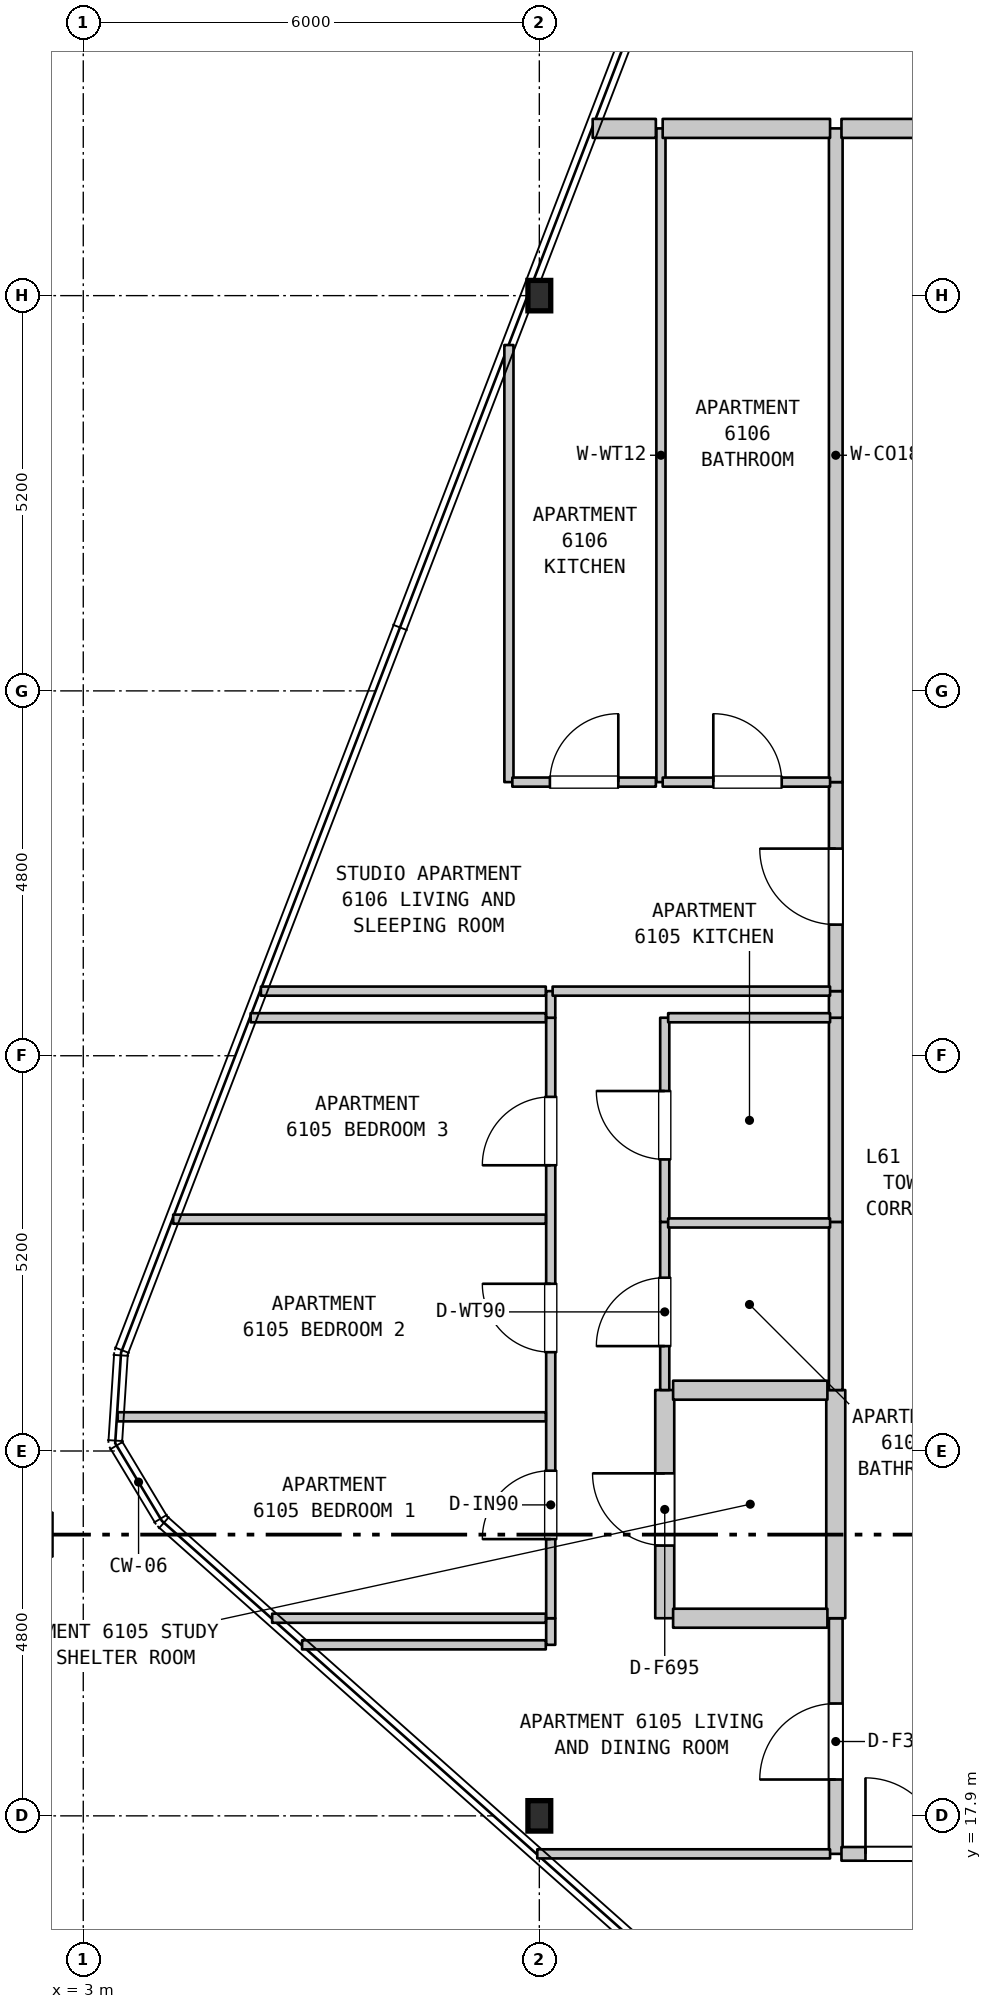
"""IFC4 building model, lengths in metres.
Left out: names, types, materials, properties, quantities, classifications, styles, units other than length and angle.
Written with IfcOpenShell. Run it as: python <this file> out.ifc"""

import sys

from ifc_helpers import new_model, si_unit, direction, frame, frame_2d, origin, origin_2d, place, context, subcontext, project, spatial, rectangle, i_section, extrude, element, fill, save


model = new_model("IFC4")
c1 = context("Model", 3, precision=1e-05, world=origin(), true_north=direction((0.0, 1.0)))
c2 = subcontext(c1, "Body", "Model", "MODEL_VIEW")
j1 = project(units=[si_unit("LENGTHUNIT", "METRE"), si_unit("PLANEANGLEUNIT", "RADIAN")], contexts=[c1])
p1 = place(None, origin())
s1 = spatial("IfcSite", under=j1, at=p1, CompositionType="ELEMENT")
p2 = place(p1, origin())
s2 = spatial("IfcBuilding", under=s1, at=p2, CompositionType="ELEMENT")
p3 = place(p2, frame((0.0, 0.0, 247.3)))
s3 = spatial("IfcBuildingStorey", under=s2, at=p3, CompositionType="ELEMENT", Elevation=247.3)
for number, where, z_axis, x_axis in (
    (1, (9.0, 17.9, 0.0), (0.0, 0.0, 1.0), (1.0, 0.0, 0.0)),
    (2, (9.0, 37.9, 0.0), (0.0, 0.0, 1.0), (1.0, 0.0, 0.0)),
):
    element("IfcColumn", number, at=place(p3, frame(where, z_axis=z_axis, x_axis=x_axis)), inside=s3, PredefinedType="COLUMN", context=c2, shape_type="SweptSolid", body=[
        extrude(i_section(OverallWidth=0.3, OverallDepth=0.4, WebThickness=0.013, FlangeThickness=0.024, FilletRadius=0.027, at=origin_2d()), origin(), (0.0, 0.0, 1.0), 3.7),
    ])
p4 = place(p3, frame((8.6, 31.5, 0.0), z_axis=(0.0, 0.0, 1.0), x_axis=(0.0, 1.0, 0.0)))
e3 = element("IfcWall", 3, at=p4, inside=s3, PredefinedType="PARTITIONING", context=c2, shape_type="SweptSolid", body=[
    extrude(rectangle(XDim=5.75, YDim=0.12, at=frame_2d((2.875, 0.0))), origin(), (0.0, 0.0, 1.0), 3.39),
])
p5 = place(p3, frame((9.15, 20.15, 0.0), z_axis=(0.0, 0.0, 1.0), x_axis=(0.0, 1.0, 0.0)))
e4 = element("IfcWall", 4, at=p5, inside=s3, PredefinedType="PARTITIONING", context=c2, shape_type="SweptSolid", body=[
    extrude(rectangle(XDim=0.35, YDim=0.12, at=frame_2d((0.175, 0.0))), origin(), (0.0, 0.0, 1.0), 3.39),
])
p6 = place(p3, frame((9.15, 20.5, 0.0), z_axis=(0.0, 0.0, 1.0), x_axis=(0.0, 1.0, 0.0)))
e5 = element("IfcWall", 5, at=p6, inside=s3, PredefinedType="PARTITIONING", context=c2, shape_type="SweptSolid", body=[
    extrude(rectangle(XDim=7.9, YDim=0.12, at=frame_2d((3.95, 0.0))), origin(), (0.0, 0.0, 1.0), 2.79),
])
p7 = place(p6, frame((1.041, 0.0, 0.0)))
e6 = element("IfcOpeningElement", 6, at=p7, cuts=e5, PredefinedType="OPENING", context=c2, shape_type="SweptSolid", body=[
    extrude(rectangle(XDim=0.9, YDim=2.15, at=frame_2d((0.45, 1.075))), frame((0.0, 0.07, 0.0), z_axis=(0.0, -1.0, 0.0), x_axis=(1.0, 0.0, 0.0)), (0.0, 0.0, 1.0), 0.14),
])
p8 = place(p6, frame((3.5, 0.0, 0.0)))
e7 = element("IfcOpeningElement", 7, at=p8, cuts=e5, PredefinedType="OPENING", context=c2, shape_type="SweptSolid", body=[
    extrude(rectangle(XDim=0.9, YDim=2.15, at=frame_2d((0.45, 1.075))), frame((0.0, 0.07, 0.0), z_axis=(0.0, -1.0, 0.0), x_axis=(1.0, 0.0, 0.0)), (0.0, 0.0, 1.0), 0.14),
])
p9 = place(p6, frame((5.959, 0.0, 0.0)))
e8 = element("IfcOpeningElement", 8, at=p9, cuts=e5, PredefinedType="OPENING", context=c2, shape_type="SweptSolid", body=[
    extrude(rectangle(XDim=0.9, YDim=2.15, at=frame_2d((0.45, 1.075))), frame((0.0, 0.07, 0.0), z_axis=(0.0, -1.0, 0.0), x_axis=(1.0, 0.0, 0.0)), (0.0, 0.0, 1.0), 0.14),
])
p10 = place(p3, frame((9.15, 28.4, 0.0), z_axis=(0.0, 0.0, 1.0), x_axis=(0.0, 1.0, 0.0)))
e9 = element("IfcWall", 9, at=p10, inside=s3, PredefinedType="PARTITIONING", context=c2, shape_type="SweptSolid", body=[
    extrude(rectangle(XDim=0.35, YDim=0.12, at=frame_2d((0.175, 0.0))), origin(), (0.0, 0.0, 1.0), 3.39),
])
p11 = place(p3, frame((10.6, 31.5, 0.0), z_axis=(0.0, 0.0, 1.0), x_axis=(0.0, 1.0, 0.0)))
e10 = element("IfcWall", 10, at=p11, inside=s3, PredefinedType="PARTITIONING", context=c2, shape_type="SweptSolid", body=[
    extrude(rectangle(XDim=8.6, YDim=0.12, at=frame_2d((4.3, 0.0))), origin(), (0.0, 0.0, 1.0), 3.39),
])
p12 = place(p3, frame((10.65, 20.5, 0.0), z_axis=(0.0, 0.0, 1.0), x_axis=(0.0, 1.0, 0.0)))
e11 = element("IfcWall", 11, at=p12, inside=s3, PredefinedType="STANDARD", context=c2, shape_type="SweptSolid", body=[
    extrude(rectangle(XDim=3.002, YDim=0.25, at=frame_2d((1.501, 0.0))), origin(), (0.0, 0.0, 1.0), 3.39),
])
p13 = place(p12, frame((0.956, 0.0, 0.0)))
e12 = element("IfcOpeningElement", 12, at=p13, cuts=e11, PredefinedType="OPENING", context=c2, shape_type="SweptSolid", body=[
    extrude(rectangle(XDim=0.95, YDim=2.15, at=frame_2d((0.475, 1.075))), frame((0.0, 0.135, 0.0), z_axis=(0.0, -1.0, 0.0), x_axis=(1.0, 0.0, 0.0)), (0.0, 0.0, 1.0), 0.27),
])
p14 = place(p3, frame((10.65, 23.502, 0.0), z_axis=(0.0, 0.0, 1.0), x_axis=(0.0, 1.0, 0.0)))
e13 = element("IfcWall", 13, at=p14, inside=s3, PredefinedType="PARTITIONING", context=c2, shape_type="SweptSolid", body=[
    extrude(rectangle(XDim=2.212, YDim=0.12, at=frame_2d((1.106, 0.0))), origin(), (0.0, 0.0, 1.0), 3.39),
])
p15 = place(p14, frame((0.578, 0.0, 0.0)))
e14 = element("IfcOpeningElement", 14, at=p15, cuts=e13, PredefinedType="OPENING", context=c2, shape_type="SweptSolid", body=[
    extrude(rectangle(XDim=0.9, YDim=2.1, at=frame_2d((0.45, 1.05))), frame((0.0, 0.07, 0.0), z_axis=(0.0, -1.0, 0.0), x_axis=(1.0, 0.0, 0.0)), (0.0, 0.0, 1.0), 0.14),
])
p16 = place(p3, frame((10.65, 25.714, 0.0), z_axis=(0.0, 0.0, 1.0), x_axis=(0.0, 1.0, 0.0)))
e15 = element("IfcWall", 15, at=p16, inside=s3, PredefinedType="PARTITIONING", context=c2, shape_type="SweptSolid", body=[
    extrude(rectangle(XDim=2.686, YDim=0.12, at=frame_2d((1.343, 0.0))), origin(), (0.0, 0.0, 1.0), 3.39),
])
p17 = place(p16, frame((0.822, 0.0, 0.0)))
e16 = element("IfcOpeningElement", 16, at=p17, cuts=e15, PredefinedType="OPENING", context=c2, shape_type="SweptSolid", body=[
    extrude(rectangle(XDim=0.9, YDim=2.15, at=frame_2d((0.45, 1.075))), frame((0.0, 0.07, 0.0), z_axis=(0.0, -1.0, 0.0), x_axis=(1.0, 0.0, 0.0)), (0.0, 0.0, 1.0), 0.14),
])
p18 = place(p3, frame((12.9, 17.4, 0.0), z_axis=(0.0, 0.0, 1.0), x_axis=(0.0, 1.0, 0.0)))
e17 = element("IfcWall", 17, at=p18, inside=s3, PredefinedType="STANDARD", context=c2, shape_type="SweptSolid", body=[
    extrude(rectangle(XDim=3.1, YDim=0.18, at=frame_2d((1.55, 0.0))), origin(), (0.0, 0.0, 1.0), 3.39),
])
p19 = place(p18, frame((0.978, 0.0, 0.0)))
e18 = element("IfcOpeningElement", 18, at=p19, cuts=e17, PredefinedType="OPENING", context=c2, shape_type="SweptSolid", body=[
    extrude(rectangle(XDim=1.0, YDim=2.15, at=frame_2d((0.5, 1.075))), frame((0.0, 0.1, 0.0), z_axis=(0.0, -1.0, 0.0), x_axis=(1.0, 0.0, 0.0)), (0.0, 0.0, 1.0), 0.2),
])
p20 = place(p3, frame((12.9, 20.5, 0.0), z_axis=(0.0, 0.0, 1.0), x_axis=(0.0, 1.0, 0.0)))
e19 = element("IfcWall", 19, at=p20, inside=s3, PredefinedType="STANDARD", context=c2, shape_type="SweptSolid", body=[
    extrude(rectangle(XDim=3.002, YDim=0.25, at=frame_2d((1.501, 0.0))), origin(), (0.0, 0.0, 1.0), 3.39),
])
p21 = place(p3, frame((12.9, 23.502, 0.0), z_axis=(0.0, 0.0, 1.0), x_axis=(0.0, 1.0, 0.0)))
e20 = element("IfcWall", 20, at=p21, inside=s3, PredefinedType="STANDARD", context=c2, shape_type="SweptSolid", body=[
    extrude(rectangle(XDim=2.212, YDim=0.18, at=frame_2d((1.106, 0.0))), origin(), (0.0, 0.0, 1.0), 3.39),
])
p22 = place(p3, frame((12.9, 25.714, 0.0), z_axis=(0.0, 0.0, 1.0), x_axis=(0.0, 1.0, 0.0)))
e21 = element("IfcWall", 21, at=p22, inside=s3, PredefinedType="STANDARD", context=c2, shape_type="SweptSolid", body=[
    extrude(rectangle(XDim=2.686, YDim=0.18, at=frame_2d((1.343, 0.0))), origin(), (0.0, 0.0, 1.0), 3.39),
])
p23 = place(p3, frame((12.9, 28.4, 0.0), z_axis=(0.0, 0.0, 1.0), x_axis=(0.0, 1.0, 0.0)))
e22 = element("IfcWall", 22, at=p23, inside=s3, PredefinedType="STANDARD", context=c2, shape_type="SweptSolid", body=[
    extrude(rectangle(XDim=0.35, YDim=0.18, at=frame_2d((0.175, 0.0))), origin(), (0.0, 0.0, 1.0), 3.39),
])
p24 = place(p3, frame((12.9, 28.75, 0.0), z_axis=(0.0, 0.0, 1.0), x_axis=(0.0, 1.0, 0.0)))
e23 = element("IfcWall", 23, at=p24, inside=s3, PredefinedType="STANDARD", context=c2, shape_type="SweptSolid", body=[
    extrude(rectangle(XDim=2.75, YDim=0.18, at=frame_2d((1.375, 0.0))), origin(), (0.0, 0.0, 1.0), 3.39),
])
p25 = place(p24, frame((0.875, 0.0, 0.0)))
e24 = element("IfcOpeningElement", 24, at=p25, cuts=e23, PredefinedType="OPENING", context=c2, shape_type="SweptSolid", body=[
    extrude(rectangle(XDim=1.0, YDim=2.15, at=frame_2d((0.5, 1.075))), frame((0.0, 0.1, 0.0), z_axis=(0.0, -1.0, 0.0), x_axis=(1.0, 0.0, 0.0)), (0.0, 0.0, 1.0), 0.2),
])
p26 = place(p3, frame((12.9, 31.5, 0.0), z_axis=(0.0, 0.0, 1.0), x_axis=(0.0, 1.0, 0.0)))
e25 = element("IfcWall", 25, at=p26, inside=s3, PredefinedType="STANDARD", context=c2, shape_type="SweptSolid", body=[
    extrude(rectangle(XDim=8.6, YDim=0.18, at=frame_2d((4.3, 0.0))), origin(), (0.0, 0.0, 1.0), 3.39),
])
p27 = place(p3, frame((8.973, 17.4, 0.0), z_axis=(0.0, 0.0, 1.0), x_axis=(1.0, 0.0, 0.0)))
e26 = element("IfcWall", 26, at=p27, inside=s3, PredefinedType="PARTITIONING", context=c2, shape_type="SweptSolid", body=[
    extrude(rectangle(XDim=3.852, YDim=0.12, at=frame_2d((1.926, 0.0))), origin(), (0.0, 0.0, 1.0), 3.39),
])
p28 = place(p3, frame((12.975, 17.4, 0.0), z_axis=(0.0, 0.0, 1.0), x_axis=(1.0, 0.0, 0.0)))
e27 = element("IfcWall", 27, at=p28, inside=s3, PredefinedType="STANDARD", context=c2, shape_type="SweptSolid", body=[
    extrude(rectangle(XDim=3.49, YDim=0.18, at=frame_2d((1.745, 0.0))), origin(), (0.0, 0.0, 1.0), 3.39),
])
p29 = place(p28, frame((0.316, 0.0, 0.0)))
e28 = element("IfcOpeningElement", 28, at=p29, cuts=e27, PredefinedType="OPENING", context=c2, shape_type="SweptSolid", body=[
    extrude(rectangle(XDim=1.0, YDim=2.15, at=frame_2d((0.5, 1.075))), frame((0.0, 0.1, 0.0), z_axis=(0.0, -1.0, 0.0), x_axis=(1.0, 0.0, 0.0)), (0.0, 0.0, 1.0), 0.2),
])
p30 = place(p3, frame((5.879, 20.15, 0.0), z_axis=(0.0, 0.0, 1.0), x_axis=(1.0, 0.0, 0.0)))
e29 = element("IfcWall", 29, at=p30, inside=s3, PredefinedType="PARTITIONING", context=c2, shape_type="SweptSolid", body=[
    extrude(rectangle(XDim=3.206, YDim=0.12, at=frame_2d((1.603, 0.0))), origin(), (0.0, 0.0, 1.0), 3.39),
])
p31 = place(p3, frame((5.485, 20.5, 0.0), z_axis=(0.0, 0.0, 1.0), x_axis=(1.0, 0.0, 0.0)))
e30 = element("IfcWall", 30, at=p31, inside=s3, PredefinedType="PARTITIONING", context=c2, shape_type="SweptSolid", body=[
    extrude(rectangle(XDim=3.6, YDim=0.12, at=frame_2d((1.8, 0.0))), origin(), (0.0, 0.0, 1.0), 3.39),
])
p32 = place(p3, frame((10.76, 20.5, 0.0), z_axis=(0.0, 0.0, 1.0), x_axis=(1.0, 0.0, 0.0)))
e31 = element("IfcWall", 31, at=p32, inside=s3, PredefinedType="STANDARD", context=c2, shape_type="SweptSolid", body=[
    extrude(rectangle(XDim=2.03, YDim=0.25, at=frame_2d((1.015, 0.0))), origin(), (0.0, 0.0, 1.0), 3.39),
])
p33 = place(p3, frame((3.452, 23.15, 0.0), z_axis=(0.0, 0.0, 1.0), x_axis=(1.0, 0.0, 0.0)))
e32 = element("IfcWall", 32, at=p33, inside=s3, PredefinedType="PARTITIONING", context=c2, shape_type="SweptSolid", body=[
    extrude(rectangle(XDim=5.633, YDim=0.12, at=frame_2d((2.816, 0.0))), origin(), (0.0, 0.0, 1.0), 3.39),
])
p34 = place(p3, frame((10.76, 23.5, 0.0), z_axis=(0.0, 0.0, 1.0), x_axis=(1.0, 0.0, 0.0)))
e33 = element("IfcWall", 33, at=p34, inside=s3, PredefinedType="STANDARD", context=c2, shape_type="SweptSolid", body=[
    extrude(rectangle(XDim=2.03, YDim=0.25, at=frame_2d((1.015, 0.0))), origin(), (0.0, 0.0, 1.0), 3.39),
])
p35 = place(p3, frame((10.695, 25.7, 0.0), z_axis=(0.0, 0.0, 1.0), x_axis=(1.0, 0.0, 0.0)))
e34 = element("IfcWall", 34, at=p35, inside=s3, PredefinedType="PARTITIONING", context=c2, shape_type="SweptSolid", body=[
    extrude(rectangle(XDim=2.13, YDim=0.12, at=frame_2d((1.065, 0.0))), origin(), (0.0, 0.0, 1.0), 3.39),
])
p36 = place(p3, frame((4.183, 25.75, 0.0), z_axis=(0.0, 0.0, 1.0), x_axis=(1.0, 0.0, 0.0)))
e35 = element("IfcWall", 35, at=p36, inside=s3, PredefinedType="PARTITIONING", context=c2, shape_type="SweptSolid", body=[
    extrude(rectangle(XDim=4.902, YDim=0.12, at=frame_2d((2.451, 0.0))), origin(), (0.0, 0.0, 1.0), 3.39),
])
p37 = place(p3, frame((5.202, 28.4, 0.0), z_axis=(0.0, 0.0, 1.0), x_axis=(1.0, 0.0, 0.0)))
e36 = element("IfcWall", 36, at=p37, inside=s3, PredefinedType="PARTITIONING", context=c2, shape_type="SweptSolid", body=[
    extrude(rectangle(XDim=3.883, YDim=0.12, at=frame_2d((1.941, 0.0))), origin(), (0.0, 0.0, 1.0), 3.39),
])
p38 = place(p3, frame((10.695, 28.4, 0.0), z_axis=(0.0, 0.0, 1.0), x_axis=(1.0, 0.0, 0.0)))
e37 = element("IfcWall", 37, at=p38, inside=s3, PredefinedType="PARTITIONING", context=c2, shape_type="SweptSolid", body=[
    extrude(rectangle(XDim=2.13, YDim=0.12, at=frame_2d((1.065, 0.0))), origin(), (0.0, 0.0, 1.0), 3.39),
])
p39 = place(p3, frame((5.337, 28.75, 0.0), z_axis=(0.0, 0.0, 1.0), x_axis=(1.0, 0.0, 0.0)))
e38 = element("IfcWall", 38, at=p39, inside=s3, PredefinedType="PARTITIONING", context=c2, shape_type="SweptSolid", body=[
    extrude(rectangle(XDim=3.748, YDim=0.12, at=frame_2d((1.874, 0.0))), origin(), (0.0, 0.0, 1.0), 3.39),
])
p40 = place(p3, frame((9.175, 28.75, 0.0), z_axis=(0.0, 0.0, 1.0), x_axis=(1.0, 0.0, 0.0)))
e39 = element("IfcWall", 39, at=p40, inside=s3, PredefinedType="PARTITIONING", context=c2, shape_type="SweptSolid", body=[
    extrude(rectangle(XDim=3.65, YDim=0.12, at=frame_2d((1.825, 0.0))), origin(), (0.0, 0.0, 1.0), 3.39),
])
p41 = place(p3, frame((8.645, 31.5, 0.0), z_axis=(0.0, 0.0, 1.0), x_axis=(1.0, 0.0, 0.0)))
e40 = element("IfcWall", 40, at=p41, inside=s3, PredefinedType="PARTITIONING", context=c2, shape_type="SweptSolid", body=[
    extrude(rectangle(XDim=1.888, YDim=0.12, at=frame_2d((0.944, 0.0))), origin(), (0.0, 0.0, 1.0), 3.39),
])
p42 = place(p41, frame((0.494, 0.0, 0.0)))
e41 = element("IfcOpeningElement", 41, at=p42, cuts=e40, PredefinedType="OPENING", context=c2, shape_type="SweptSolid", body=[
    extrude(rectangle(XDim=0.9, YDim=2.15, at=frame_2d((0.45, 1.075))), frame((0.0, 0.07, 0.0), z_axis=(0.0, -1.0, 0.0), x_axis=(1.0, 0.0, 0.0)), (0.0, 0.0, 1.0), 0.14),
])
p43 = place(p3, frame((10.623, 31.5, 0.0), z_axis=(0.0, 0.0, 1.0), x_axis=(1.0, 0.0, 0.0)))
e42 = element("IfcWall", 42, at=p43, inside=s3, PredefinedType="PARTITIONING", context=c2, shape_type="SweptSolid", body=[
    extrude(rectangle(XDim=2.202, YDim=0.12, at=frame_2d((1.101, 0.0))), origin(), (0.0, 0.0, 1.0), 3.39),
])
p44 = place(p43, frame((0.666, 0.0, 0.0)))
e43 = element("IfcOpeningElement", 43, at=p44, cuts=e42, PredefinedType="OPENING", context=c2, shape_type="SweptSolid", body=[
    extrude(rectangle(XDim=0.9, YDim=2.1, at=frame_2d((0.45, 1.05))), frame((0.0, 0.07, 0.0), z_axis=(0.0, -1.0, 0.0), x_axis=(1.0, 0.0, 0.0)), (0.0, 0.0, 1.0), 0.14),
])
p45 = place(p3, frame((9.702, 40.1, 0.0), z_axis=(0.0, 0.0, 1.0), x_axis=(1.0, 0.0, 0.0)))
e44 = element("IfcWall", 44, at=p45, inside=s3, PredefinedType="STANDARD", context=c2, shape_type="SweptSolid", body=[
    extrude(rectangle(XDim=0.831, YDim=0.25, at=frame_2d((0.416, 0.0))), origin(), (0.0, 0.0, 1.0), 3.39),
])
p46 = place(p3, frame((10.623, 40.1, 0.0), z_axis=(0.0, 0.0, 1.0), x_axis=(1.0, 0.0, 0.0)))
e45 = element("IfcWall", 45, at=p46, inside=s3, PredefinedType="STANDARD", context=c2, shape_type="SweptSolid", body=[
    extrude(rectangle(XDim=2.202, YDim=0.25, at=frame_2d((1.101, 0.0))), origin(), (0.0, 0.0, 1.0), 3.39),
])
p47 = place(p3, frame((12.975, 40.1, 0.0), z_axis=(0.0, 0.0, 1.0), x_axis=(1.0, 0.0, 0.0)))
e46 = element("IfcWall", 46, at=p47, inside=s3, PredefinedType="STANDARD", context=c2, shape_type="SweptSolid", body=[
    extrude(rectangle(XDim=1.48, YDim=0.25, at=frame_2d((0.74, 0.0))), origin(), (0.0, 0.0, 1.0), 3.39),
])
p48 = place(p7, origin())
e47 = element("IfcDoor", 47, at=p48, inside=s3, OperationType="SINGLE_SWING_LEFT", PredefinedType="DOOR", context=c2, shape_type="SweptSolid", body=[
    extrude(rectangle(XDim=0.9, YDim=2.15, at=frame_2d((0.45, 1.075))), frame((0.0, 0.025, 0.0), z_axis=(0.0, -1.0, 0.0), x_axis=(1.0, 0.0, 0.0)), (0.0, 0.0, 1.0), 0.05),
])
fill(e6, e47)
p49 = place(p8, origin())
e48 = element("IfcDoor", 48, at=p49, inside=s3, OperationType="SINGLE_SWING_RIGHT", PredefinedType="DOOR", context=c2, shape_type="SweptSolid", body=[
    extrude(rectangle(XDim=0.9, YDim=2.15, at=frame_2d((0.45, 1.075))), frame((0.0, 0.025, 0.0), z_axis=(0.0, -1.0, 0.0), x_axis=(1.0, 0.0, 0.0)), (0.0, 0.0, 1.0), 0.05),
])
fill(e7, e48)
p50 = place(p9, origin())
e49 = element("IfcDoor", 49, at=p50, inside=s3, OperationType="SINGLE_SWING_LEFT", PredefinedType="DOOR", context=c2, shape_type="SweptSolid", body=[
    extrude(rectangle(XDim=0.9, YDim=2.15, at=frame_2d((0.45, 1.075))), frame((0.0, 0.025, 0.0), z_axis=(0.0, -1.0, 0.0), x_axis=(1.0, 0.0, 0.0)), (0.0, 0.0, 1.0), 0.05),
])
fill(e8, e49)
p51 = place(p13, origin())
e50 = element("IfcDoor", 50, at=p51, inside=s3, OperationType="SINGLE_SWING_RIGHT", PredefinedType="DOOR", context=c2, shape_type="SweptSolid", body=[
    extrude(rectangle(XDim=0.95, YDim=2.15, at=frame_2d((0.475, 1.075))), frame((0.0, 0.025, 0.0), z_axis=(0.0, -1.0, 0.0), x_axis=(1.0, 0.0, 0.0)), (0.0, 0.0, 1.0), 0.05),
])
fill(e12, e50)
p52 = place(p15, origin())
e51 = element("IfcDoor", 51, at=p52, inside=s3, OperationType="SINGLE_SWING_LEFT", PredefinedType="DOOR", context=c2, shape_type="SweptSolid", body=[
    extrude(rectangle(XDim=0.9, YDim=2.1, at=frame_2d((0.45, 1.05))), frame((0.0, 0.025, 0.0), z_axis=(0.0, -1.0, 0.0), x_axis=(1.0, 0.0, 0.0)), (0.0, 0.0, 1.0), 0.05),
])
fill(e14, e51)
p53 = place(p17, origin())
e52 = element("IfcDoor", 52, at=p53, inside=s3, OperationType="SINGLE_SWING_RIGHT", PredefinedType="DOOR", context=c2, shape_type="SweptSolid", body=[
    extrude(rectangle(XDim=0.9, YDim=2.15, at=frame_2d((0.45, 1.075))), frame((0.0, 0.025, 0.0), z_axis=(0.0, -1.0, 0.0), x_axis=(1.0, 0.0, 0.0)), (0.0, 0.0, 1.0), 0.05),
])
fill(e16, e52)
p54 = place(p19, origin())
e53 = element("IfcDoor", 53, at=p54, inside=s3, OperationType="SINGLE_SWING_LEFT", PredefinedType="DOOR", context=c2, shape_type="SweptSolid", body=[
    extrude(rectangle(XDim=1.0, YDim=2.15, at=frame_2d((0.5, 1.075))), frame((0.0, 0.025, 0.0), z_axis=(0.0, -1.0, 0.0), x_axis=(1.0, 0.0, 0.0)), (0.0, 0.0, 1.0), 0.05),
])
fill(e18, e53)
p55 = place(p25, origin())
e54 = element("IfcDoor", 54, at=p55, inside=s3, OperationType="SINGLE_SWING_RIGHT", PredefinedType="DOOR", context=c2, shape_type="SweptSolid", body=[
    extrude(rectangle(XDim=1.0, YDim=2.15, at=frame_2d((0.5, 1.075))), frame((0.0, 0.025, 0.0), z_axis=(0.0, -1.0, 0.0), x_axis=(1.0, 0.0, 0.0)), (0.0, 0.0, 1.0), 0.05),
])
fill(e24, e54)
p56 = place(p29, origin())
e55 = element("IfcDoor", 55, at=p56, inside=s3, OperationType="SINGLE_SWING_LEFT", PredefinedType="DOOR", context=c2, shape_type="SweptSolid", body=[
    extrude(rectangle(XDim=1.0, YDim=2.15, at=frame_2d((0.5, 1.075))), frame((0.0, 0.025, 0.0), z_axis=(0.0, -1.0, 0.0), x_axis=(1.0, 0.0, 0.0)), (0.0, 0.0, 1.0), 0.05),
])
fill(e28, e55)
p57 = place(p42, origin())
e56 = element("IfcDoor", 56, at=p57, inside=s3, OperationType="SINGLE_SWING_RIGHT", PredefinedType="DOOR", context=c2, shape_type="SweptSolid", body=[
    extrude(rectangle(XDim=0.9, YDim=2.15, at=frame_2d((0.45, 1.075))), frame((0.0, 0.025, 0.0), z_axis=(0.0, -1.0, 0.0), x_axis=(1.0, 0.0, 0.0)), (0.0, 0.0, 1.0), 0.05),
])
fill(e41, e56)
p58 = place(p44, origin())
e57 = element("IfcDoor", 57, at=p58, inside=s3, OperationType="SINGLE_SWING_LEFT", PredefinedType="DOOR", context=c2, shape_type="SweptSolid", body=[
    extrude(rectangle(XDim=0.9, YDim=2.1, at=frame_2d((0.45, 1.05))), frame((0.0, 0.025, 0.0), z_axis=(0.0, -1.0, 0.0), x_axis=(1.0, 0.0, 0.0)), (0.0, 0.0, 1.0), 0.05),
])
fill(e43, e57)
save(model, sys.argv[1])
